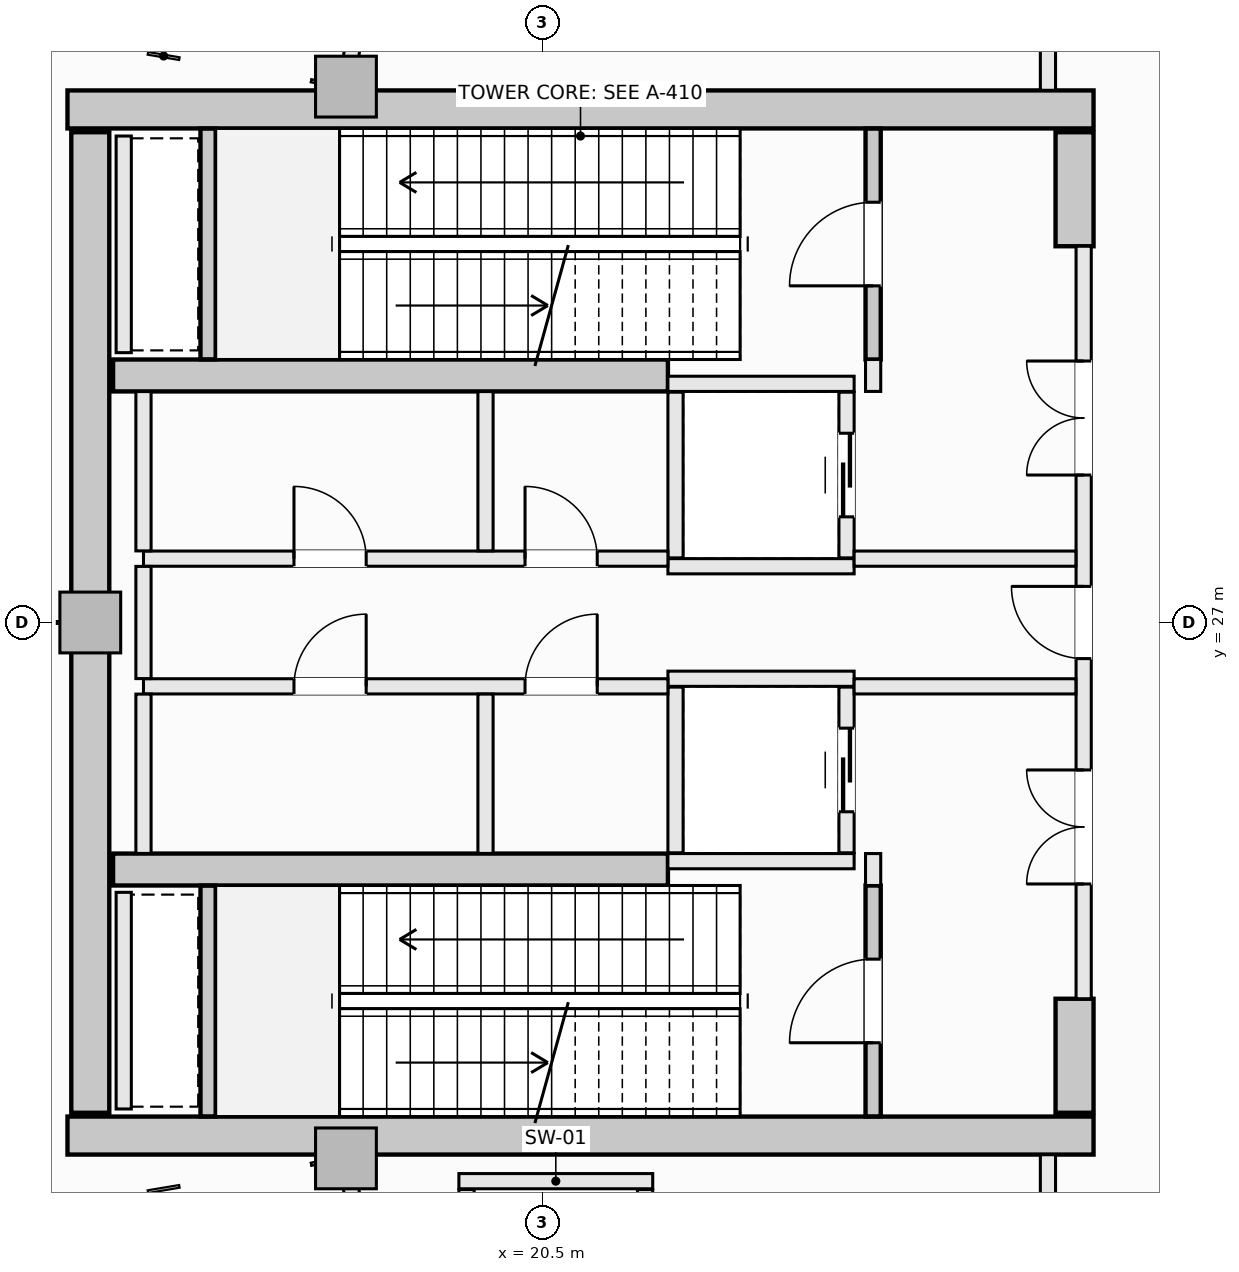
"""IFC4 building model, lengths in metres.
Left out: names, types, materials, properties, quantities, classifications, styles, units other than length and angle.
Written with IfcOpenShell. Run it as: python <this file> out.ifc"""

import sys

from ifc_helpers import new_model, si_unit, direction, frame, frame_2d, origin, origin_2d, place, context, subcontext, project, spatial, rectangle, extrude, element, fill, save


model = new_model("IFC4")
c1 = context("Model", 3, precision=1e-05, world=origin(), true_north=direction((0.0, 1.0)))
c2 = subcontext(c1, "Body", "Model", "MODEL_VIEW")
j1 = project(units=[si_unit("LENGTHUNIT", "METRE"), si_unit("PLANEANGLEUNIT", "RADIAN")], contexts=[c1])
p1 = place(None, origin())
s1 = spatial("IfcSite", under=j1, at=p1, CompositionType="ELEMENT")
p2 = place(p1, origin())
s2 = spatial("IfcBuilding", under=s1, at=p2, CompositionType="ELEMENT")
p3 = place(p2, frame((0.0, 0.0, 275.6)))
s3 = spatial("IfcBuildingStorey", under=s2, at=p3, CompositionType="ELEMENT", Elevation=275.6)
for number, where, z_axis, x_axis in (
    (1, (14.25, 33.75, -0.32), (0.0, 0.0, 1.0), (1.0, 0.0, 0.0)),
    (2, (14.25, 20.25, -0.32), (0.0, 0.0, 1.0), (1.0, 0.0, 0.0)),
):
    element("IfcWall", number, at=place(p3, frame(where, z_axis=z_axis, x_axis=x_axis)), inside=s3, PredefinedType="SHEAR", context=c2, shape_type="SweptSolid", body=[
        extrude(rectangle(XDim=13.5, YDim=0.5, at=frame_2d((6.75, 0.0))), origin(), (0.0, 0.0, 1.0), 6.04),
    ])
p4 = place(p3, frame((14.55, 20.55, -0.32), z_axis=(0.0, 0.0, 1.0), x_axis=(0.0, 1.0, 0.0)))
e3 = element("IfcWall", 3, at=p4, inside=s3, PredefinedType="SHEAR", context=c2, shape_type="SweptSolid", body=[
    extrude(rectangle(XDim=12.9, YDim=0.5, at=frame_2d((6.45, 0.0))), origin(), (0.0, 0.0, 1.0), 6.04),
])
for number, where, z_axis, x_axis in (
    (4, (27.5, 31.95, -0.32), (0.0, 0.0, 1.0), (0.0, 1.0, 0.0)),
    (5, (27.5, 20.55, -0.32), (0.0, 0.0, 1.0), (0.0, 1.0, 0.0)),
):
    element("IfcWall", number, at=place(p3, frame(where, z_axis=z_axis, x_axis=x_axis)), inside=s3, PredefinedType="SHEAR", context=c2, shape_type="SweptSolid", body=[
        extrude(rectangle(XDim=1.5, YDim=0.5, at=frame_2d((0.75, 0.0))), origin(), (0.0, 0.0, 1.0), 6.04),
    ])
for number, where, z_axis, x_axis in (
    (6, (14.85, 30.25, -0.32), (0.0, 0.0, 1.0), (1.0, 0.0, 0.0)),
    (7, (14.85, 23.75, -0.32), (0.0, 0.0, 1.0), (1.0, 0.0, 0.0)),
):
    element("IfcWall", number, at=place(p3, frame(where, z_axis=z_axis, x_axis=x_axis)), inside=s3, PredefinedType="SHEAR", context=c2, shape_type="SweptSolid", body=[
        extrude(rectangle(XDim=7.3, YDim=0.42, at=frame_2d((3.65, 0.0))), origin(), (0.0, 0.0, 1.0), 6.04),
    ])
for number, where, z_axis, x_axis in (
    (8, (17.914, 34.05, -0.32), (0.0, 0.0, 1.0), (1.0, 0.0, 0.0)),
    (9, (14.55, 27.0, -0.32), (0.0, 0.0, 1.0), (1.0, 0.0, 0.0)),
    (10, (17.914, 19.95, -0.32), (0.0, 0.0, 1.0), (1.0, 0.0, 0.0)),
):
    element("IfcColumn", number, at=place(p3, frame(where, z_axis=z_axis, x_axis=x_axis)), inside=s3, PredefinedType="PILASTER", context=c2, shape_type="SweptSolid", body=[
        extrude(rectangle(XDim=0.8, YDim=0.8, at=origin_2d()), origin(), (0.0, 0.0, 1.0), 6.04),
    ])
p5 = place(p3, frame((24.85, 30.46, -0.32), z_axis=(0.0, 0.0, 1.0), x_axis=(0.0, 1.0, 0.0)))
e11 = element("IfcWall", 11, at=p5, inside=s3, PredefinedType="SHEAR", context=c2, shape_type="SweptSolid", body=[
    extrude(rectangle(XDim=3.038, YDim=0.2, at=frame_2d((1.519, 0.0))), origin(), (0.0, 0.0, 1.0), 6.04),
])
p6 = place(p5, frame((0.969, 0.0, 0.32)))
e12 = element("IfcOpeningElement", 12, at=p6, cuts=e11, PredefinedType="OPENING", context=c2, shape_type="SweptSolid", body=[
    extrude(rectangle(XDim=1.1, YDim=2.15, at=frame_2d((0.55, 1.075))), frame((0.0, 0.11, 0.0), z_axis=(0.0, -1.0, 0.0), x_axis=(1.0, 0.0, 0.0)), (0.0, 0.0, 1.0), 0.22),
])
p7 = place(p3, frame((16.1, 30.462, -0.32), z_axis=(0.0, 0.0, 1.0), x_axis=(0.0, 1.0, 0.0)))
e13 = element("IfcWall", 13, at=p7, inside=s3, PredefinedType="SHEAR", context=c2, shape_type="SweptSolid", body=[
    extrude(rectangle(XDim=3.036, YDim=0.2, at=frame_2d((1.518, 0.0))), origin(), (0.0, 0.0, 1.0), 6.04),
])
p8 = place(p3, frame((24.85, 20.502, -0.32), z_axis=(0.0, 0.0, 1.0), x_axis=(0.0, 1.0, 0.0)))
e14 = element("IfcWall", 14, at=p8, inside=s3, PredefinedType="SHEAR", context=c2, shape_type="SweptSolid", body=[
    extrude(rectangle(XDim=3.038, YDim=0.2, at=frame_2d((1.519, 0.0))), origin(), (0.0, 0.0, 1.0), 6.04),
])
p9 = place(p8, frame((0.969, 0.0, 0.32)))
e15 = element("IfcOpeningElement", 15, at=p9, cuts=e14, PredefinedType="OPENING", context=c2, shape_type="SweptSolid", body=[
    extrude(rectangle(XDim=1.1, YDim=2.15, at=frame_2d((0.55, 1.075))), frame((0.0, 0.11, 0.0), z_axis=(0.0, -1.0, 0.0), x_axis=(1.0, 0.0, 0.0)), (0.0, 0.0, 1.0), 0.22),
])
p10 = place(p3, frame((16.1, 20.502, -0.32), z_axis=(0.0, 0.0, 1.0), x_axis=(0.0, 1.0, 0.0)))
e16 = element("IfcWall", 16, at=p10, inside=s3, PredefinedType="SHEAR", context=c2, shape_type="SweptSolid", body=[
    extrude(rectangle(XDim=3.036, YDim=0.2, at=frame_2d((1.518, 0.0))), origin(), (0.0, 0.0, 1.0), 6.04),
])
for number, where, z_axis, x_axis in (
    (17, (22.15, 30.14, 0.0), (0.0, 0.0, 1.0), (1.0, 0.0, 0.0)),
    (18, (22.15, 27.74, 0.0), (0.0, 0.0, 1.0), (1.0, 0.0, 0.0)),
):
    element("IfcWall", number, at=place(p3, frame(where, z_axis=z_axis, x_axis=x_axis)), inside=s3, PredefinedType="SOLIDWALL", context=c2, shape_type="SweptSolid", body=[
        extrude(rectangle(XDim=2.45, YDim=0.2, at=frame_2d((1.225, 0.0))), origin(), (0.0, 0.0, 1.0), 5.72),
    ])
p11 = place(p3, frame((22.25, 27.85, 0.0), z_axis=(0.0, 0.0, 1.0), x_axis=(0.0, 1.0, 0.0)))
e19 = element("IfcWall", 19, at=p11, inside=s3, PredefinedType="SOLIDWALL", context=c2, shape_type="SweptSolid", body=[
    extrude(rectangle(XDim=2.18, YDim=0.2, at=frame_2d((1.09, 0.0))), origin(), (0.0, 0.0, 1.0), 5.72),
])
p12 = place(p3, frame((24.5, 27.85, 0.0), z_axis=(0.0, 0.0, 1.0), x_axis=(0.0, 1.0, 0.0)))
e20 = element("IfcWall", 20, at=p12, inside=s3, PredefinedType="SOLIDWALL", context=c2, shape_type="SweptSolid", body=[
    extrude(rectangle(XDim=2.18, YDim=0.2, at=frame_2d((1.09, 0.0))), origin(), (0.0, 0.0, 1.0), 5.72),
])
p13 = place(p12, frame((0.54, 0.0, 0.0)))
e21 = element("IfcOpeningElement", 21, at=p13, cuts=e20, PredefinedType="OPENING", context=c2, shape_type="SweptSolid", body=[
    extrude(rectangle(XDim=1.1, YDim=2.2, at=frame_2d((0.55, 1.1))), frame((0.0, 0.11, 0.0), z_axis=(0.0, -1.0, 0.0), x_axis=(1.0, 0.0, 0.0)), (0.0, 0.0, 1.0), 0.22),
])
for number, where, z_axis, x_axis in (
    (22, (22.15, 26.26, 0.0), (0.0, 0.0, 1.0), (1.0, 0.0, 0.0)),
    (23, (22.15, 23.86, 0.0), (0.0, 0.0, 1.0), (1.0, 0.0, 0.0)),
):
    element("IfcWall", number, at=place(p3, frame(where, z_axis=z_axis, x_axis=x_axis)), inside=s3, PredefinedType="SOLIDWALL", context=c2, shape_type="SweptSolid", body=[
        extrude(rectangle(XDim=2.45, YDim=0.2, at=frame_2d((1.225, 0.0))), origin(), (0.0, 0.0, 1.0), 5.72),
    ])
p14 = place(p3, frame((22.25, 23.97, 0.0), z_axis=(0.0, 0.0, 1.0), x_axis=(0.0, 1.0, 0.0)))
e24 = element("IfcWall", 24, at=p14, inside=s3, PredefinedType="SOLIDWALL", context=c2, shape_type="SweptSolid", body=[
    extrude(rectangle(XDim=2.18, YDim=0.2, at=frame_2d((1.09, 0.0))), origin(), (0.0, 0.0, 1.0), 5.72),
])
p15 = place(p3, frame((24.5, 23.97, 0.0), z_axis=(0.0, 0.0, 1.0), x_axis=(0.0, 1.0, 0.0)))
e25 = element("IfcWall", 25, at=p15, inside=s3, PredefinedType="SOLIDWALL", context=c2, shape_type="SweptSolid", body=[
    extrude(rectangle(XDim=2.18, YDim=0.2, at=frame_2d((1.09, 0.0))), origin(), (0.0, 0.0, 1.0), 5.72),
])
p16 = place(p15, frame((0.54, 0.0, 0.0)))
e26 = element("IfcOpeningElement", 26, at=p16, cuts=e25, PredefinedType="OPENING", context=c2, shape_type="SweptSolid", body=[
    extrude(rectangle(XDim=1.1, YDim=2.2, at=frame_2d((0.55, 1.1))), frame((0.0, 0.11, 0.0), z_axis=(0.0, -1.0, 0.0), x_axis=(1.0, 0.0, 0.0)), (0.0, 0.0, 1.0), 0.22),
])
p17 = place(p3, frame((19.4, 19.65, 0.0), z_axis=(0.0, 0.0, 1.0), x_axis=(1.0, 0.0, 0.0)))
e27 = element("IfcWall", 27, at=p17, inside=s3, PredefinedType="SOLIDWALL", context=c2, shape_type="SweptSolid", body=[
    extrude(rectangle(XDim=2.55, YDim=0.2, at=frame_2d((1.275, 0.0))), origin(), (0.0, 0.0, 1.0), 5.72),
])
for number, where, z_axis, x_axis in (
    (28, (19.5, 17.01, 0.0), (0.0, 0.0, 1.0), (0.0, 1.0, 0.0)),
    (29, (21.85, 17.01, 0.0), (0.0, 0.0, 1.0), (0.0, 1.0, 0.0)),
):
    element("IfcWall", number, at=place(p3, frame(where, z_axis=z_axis, x_axis=x_axis)), inside=s3, PredefinedType="SOLIDWALL", context=c2, shape_type="SweptSolid", body=[
        extrude(rectangle(XDim=2.53, YDim=0.2, at=frame_2d((1.265, 0.0))), origin(), (0.0, 0.0, 1.0), 5.72),
    ])
for number, where, z_axis, x_axis in (
    (30, (14.99, 30.55, 0.0), (0.0, 0.0, 1.0), (0.0, 1.0, 0.0)),
    (31, (14.99, 20.6, 0.0), (0.0, 0.0, 1.0), (0.0, 1.0, 0.0)),
):
    element("IfcWall", number, at=place(p3, frame(where, z_axis=z_axis, x_axis=x_axis)), inside=s3, PredefinedType="SOLIDWALL", context=c2, shape_type="SweptSolid", body=[
        extrude(rectangle(XDim=2.85, YDim=0.2, at=frame_2d((1.425, 0.0))), origin(), (0.0, 0.0, 1.0), 5.72),
    ])
for number, where, z_axis, x_axis in (
    (32, (24.85, 23.54, 0.0), (0.0, 0.0, 1.0), (0.0, 1.0, 0.0)),
    (33, (24.85, 30.04, 0.0), (0.0, 0.0, 1.0), (0.0, 1.0, 0.0)),
):
    element("IfcWall", number, at=place(p3, frame(where, z_axis=z_axis, x_axis=x_axis)), inside=s3, PredefinedType="SOLIDWALL", context=c2, shape_type="SweptSolid", body=[
        extrude(rectangle(XDim=0.42, YDim=0.2, at=frame_2d((0.21, 0.0))), origin(), (0.0, 0.0, 1.0), 5.72),
    ])
p18 = place(p3, frame((27.62, 22.05, 0.0), z_axis=(0.0, 0.0, 1.0), x_axis=(0.0, 1.0, 0.0)))
e34 = element("IfcWall", 34, at=p18, inside=s3, PredefinedType="SOLIDWALL", context=c2, shape_type="SweptSolid", body=[
    extrude(rectangle(XDim=9.9, YDim=0.2, at=frame_2d((4.95, 0.0))), origin(), (0.0, 0.0, 1.0), 4.812),
])
p19 = place(p18, frame((4.475, 0.0, 0.0)))
e35 = element("IfcOpeningElement", 35, at=p19, cuts=e34, PredefinedType="OPENING", context=c2, shape_type="SweptSolid", body=[
    extrude(rectangle(XDim=0.95, YDim=2.1, at=frame_2d((0.475, 1.05))), frame((0.0, 0.11, 0.0), z_axis=(0.0, -1.0, 0.0), x_axis=(1.0, 0.0, 0.0)), (0.0, 0.0, 1.0), 0.22),
])
p20 = place(p18, frame((6.89, 0.0, 0.0)))
e36 = element("IfcOpeningElement", 36, at=p20, cuts=e34, PredefinedType="OPENING", context=c2, shape_type="SweptSolid", body=[
    extrude(rectangle(XDim=1.5, YDim=2.2, at=frame_2d((0.75, 1.1))), frame((0.0, 0.11, 0.0), z_axis=(0.0, -1.0, 0.0), x_axis=(1.0, 0.0, 0.0)), (0.0, 0.0, 1.0), 0.22),
])
p21 = place(p18, frame((1.51, 0.0, 0.0)))
e37 = element("IfcOpeningElement", 37, at=p21, cuts=e34, PredefinedType="OPENING", context=c2, shape_type="SweptSolid", body=[
    extrude(rectangle(XDim=1.5, YDim=2.2, at=frame_2d((0.75, 1.1))), frame((0.0, 0.11, 0.0), z_axis=(0.0, -1.0, 0.0), x_axis=(1.0, 0.0, 0.0)), (0.0, 0.0, 1.0), 0.22),
])
p22 = place(p3, frame((15.25, 27.84, 0.0), z_axis=(0.0, 0.0, 1.0), x_axis=(1.0, 0.0, 0.0)))
e38 = element("IfcWall", 38, at=p22, inside=s3, PredefinedType="SOLIDWALL", context=c2, shape_type="SweptSolid", body=[
    extrude(rectangle(XDim=6.9, YDim=0.2, at=frame_2d((3.45, 0.0))), origin(), (0.0, 0.0, 1.0), 5.72),
])
p23 = place(p22, frame((5.02, 0.0, 0.0)))
e39 = element("IfcOpeningElement", 39, at=p23, cuts=e38, PredefinedType="OPENING", context=c2, shape_type="SweptSolid", body=[
    extrude(rectangle(XDim=0.95, YDim=2.1, at=frame_2d((0.475, 1.05))), frame((0.0, 0.11, 0.0), z_axis=(0.0, -1.0, 0.0), x_axis=(1.0, 0.0, 0.0)), (0.0, 0.0, 1.0), 0.22),
])
p24 = place(p22, frame((1.98, 0.0, 0.0)))
e40 = element("IfcOpeningElement", 40, at=p24, cuts=e38, PredefinedType="OPENING", context=c2, shape_type="SweptSolid", body=[
    extrude(rectangle(XDim=0.95, YDim=2.1, at=frame_2d((0.475, 1.05))), frame((0.0, 0.11, 0.0), z_axis=(0.0, -1.0, 0.0), x_axis=(1.0, 0.0, 0.0)), (0.0, 0.0, 1.0), 0.22),
])
p25 = place(p3, frame((24.6, 27.84, 0.0), z_axis=(0.0, 0.0, 1.0), x_axis=(1.0, 0.0, 0.0)))
e41 = element("IfcWall", 41, at=p25, inside=s3, PredefinedType="SOLIDWALL", context=c2, shape_type="SweptSolid", body=[
    extrude(rectangle(XDim=2.918, YDim=0.2, at=frame_2d((1.459, 0.0))), origin(), (0.0, 0.0, 1.0), 5.72),
])
p26 = place(p3, frame((15.25, 26.16, 0.0), z_axis=(0.0, 0.0, 1.0), x_axis=(1.0, 0.0, 0.0)))
e42 = element("IfcWall", 42, at=p26, inside=s3, PredefinedType="SOLIDWALL", context=c2, shape_type="SweptSolid", body=[
    extrude(rectangle(XDim=6.9, YDim=0.2, at=frame_2d((3.45, 0.0))), origin(), (0.0, 0.0, 1.0), 5.72),
])
p27 = place(p26, frame((5.02, 0.0, 0.0)))
e43 = element("IfcOpeningElement", 43, at=p27, cuts=e42, PredefinedType="OPENING", context=c2, shape_type="SweptSolid", body=[
    extrude(rectangle(XDim=0.95, YDim=2.1, at=frame_2d((0.475, 1.05))), frame((0.0, 0.11, 0.0), z_axis=(0.0, -1.0, 0.0), x_axis=(1.0, 0.0, 0.0)), (0.0, 0.0, 1.0), 0.22),
])
p28 = place(p26, frame((1.98, 0.0, 0.0)))
e44 = element("IfcOpeningElement", 44, at=p28, cuts=e42, PredefinedType="OPENING", context=c2, shape_type="SweptSolid", body=[
    extrude(rectangle(XDim=0.95, YDim=2.1, at=frame_2d((0.475, 1.05))), frame((0.0, 0.11, 0.0), z_axis=(0.0, -1.0, 0.0), x_axis=(1.0, 0.0, 0.0)), (0.0, 0.0, 1.0), 0.22),
])
p29 = place(p3, frame((24.6, 26.16, 0.0), z_axis=(0.0, 0.0, 1.0), x_axis=(1.0, 0.0, 0.0)))
e45 = element("IfcWall", 45, at=p29, inside=s3, PredefinedType="SOLIDWALL", context=c2, shape_type="SweptSolid", body=[
    extrude(rectangle(XDim=2.918, YDim=0.2, at=frame_2d((1.459, 0.0))), origin(), (0.0, 0.0, 1.0), 5.72),
])
p30 = place(p3, frame((15.25, 23.962, 0.0), z_axis=(0.0, 0.0, 1.0), x_axis=(0.0, 1.0, 0.0)))
e46 = element("IfcWall", 46, at=p30, inside=s3, PredefinedType="SOLIDWALL", context=c2, shape_type="SweptSolid", body=[
    extrude(rectangle(XDim=2.096, YDim=0.2, at=frame_2d((1.048, 0.0))), origin(), (0.0, 0.0, 1.0), 5.72),
])
p31 = place(p3, frame((15.25, 26.262, 0.0), z_axis=(0.0, 0.0, 1.0), x_axis=(0.0, 1.0, 0.0)))
e47 = element("IfcWall", 47, at=p31, inside=s3, PredefinedType="SOLIDWALL", context=c2, shape_type="SweptSolid", body=[
    extrude(rectangle(XDim=1.476, YDim=0.2, at=frame_2d((0.738, 0.0))), origin(), (0.0, 0.0, 1.0), 5.72),
])
for number, where, z_axis, x_axis in (
    (48, (15.25, 27.942, 0.0), (0.0, 0.0, 1.0), (0.0, 1.0, 0.0)),
    (49, (19.75, 23.962, 0.0), (0.0, 0.0, 1.0), (0.0, 1.0, 0.0)),
    (50, (19.75, 27.942, 0.0), (0.0, 0.0, 1.0), (0.0, 1.0, 0.0)),
):
    element("IfcWall", number, at=place(p3, frame(where, z_axis=z_axis, x_axis=x_axis)), inside=s3, PredefinedType="SOLIDWALL", context=c2, shape_type="SweptSolid", body=[
        extrude(rectangle(XDim=2.096, YDim=0.2, at=frame_2d((1.048, 0.0))), origin(), (0.0, 0.0, 1.0), 5.72),
    ])
p32 = place(p3, frame((27.15, 14.95, 0.0), z_axis=(0.0, 0.0, 1.0), x_axis=(0.0, 1.0, 0.0)))
e51 = element("IfcWall", 51, at=p32, inside=s3, PredefinedType="SOLIDWALL", context=c2, shape_type="SweptSolid", body=[
    extrude(rectangle(XDim=5.048, YDim=0.2, at=frame_2d((2.524, 0.0))), origin(), (0.0, 0.0, 1.0), 5.72),
])
p33 = place(p32, frame((2.049, 0.0, 0.0)))
e52 = element("IfcOpeningElement", 52, at=p33, cuts=e51, PredefinedType="OPENING", context=c2, shape_type="SweptSolid", body=[
    extrude(rectangle(XDim=0.95, YDim=2.1, at=frame_2d((0.475, 1.05))), frame((0.0, 0.11, 0.0), z_axis=(0.0, -1.0, 0.0), x_axis=(1.0, 0.0, 0.0)), (0.0, 0.0, 1.0), 0.22),
])
p34 = place(p3, frame((27.15, 34.002, 0.0), z_axis=(0.0, 0.0, 1.0), x_axis=(0.0, 1.0, 0.0)))
e53 = element("IfcWall", 53, at=p34, inside=s3, PredefinedType="SOLIDWALL", context=c2, shape_type="SweptSolid", body=[
    extrude(rectangle(XDim=1.748, YDim=0.2, at=frame_2d((0.874, 0.0))), origin(), (0.0, 0.0, 1.0), 5.72),
])
p35 = place(p3, frame((17.914, 19.95, 0.0), z_axis=(0.0, 0.0, 1.0), x_axis=(0.166098703356, -0.986109132269, 0.0)))
e54 = element("IfcWall", 54, at=p35, inside=s3, PredefinedType="SOLIDWALL", context=c2, shape_type="SweptSolid", body=[
    extrude(rectangle(XDim=1.048, YDim=0.2, at=frame_2d((0.524, 0.0))), origin(), (0.0, 0.0, 1.0), 5.168),
])
p36 = place(p3, frame((17.906, 34.002, 0.0), z_axis=(0.0, 0.0, 1.0), x_axis=(0.166182071534, 0.986095086237, 0.0)))
e55 = element("IfcWall", 55, at=p36, inside=s3, PredefinedType="SOLIDWALL", context=c2, shape_type="SweptSolid", body=[
    extrude(rectangle(XDim=1.199, YDim=0.2, at=frame_2d((0.599, 0.0))), origin(), (0.0, 0.0, 1.0), 5.168),
])
p37 = place(p6, origin())
e56 = element("IfcDoor", 56, at=p37, inside=s3, OperationType="SINGLE_SWING_LEFT", PredefinedType="DOOR", context=c2, shape_type="SweptSolid", body=[
    extrude(rectangle(XDim=1.1, YDim=2.15, at=frame_2d((0.55, 1.075))), frame((0.0, 0.025, 0.0), z_axis=(0.0, -1.0, 0.0), x_axis=(1.0, 0.0, 0.0)), (0.0, 0.0, 1.0), 0.05),
])
fill(e12, e56)
p38 = place(p9, origin())
e57 = element("IfcDoor", 57, at=p38, inside=s3, OperationType="SINGLE_SWING_LEFT", PredefinedType="DOOR", context=c2, shape_type="SweptSolid", body=[
    extrude(rectangle(XDim=1.1, YDim=2.15, at=frame_2d((0.55, 1.075))), frame((0.0, 0.025, 0.0), z_axis=(0.0, -1.0, 0.0), x_axis=(1.0, 0.0, 0.0)), (0.0, 0.0, 1.0), 0.05),
])
fill(e15, e57)
p39 = place(p13, origin())
e58 = element("IfcDoor", 58, at=p39, inside=s3, OperationType="SLIDING_TO_LEFT", PredefinedType="DOOR", context=c2, shape_type="SweptSolid", body=[
    extrude(rectangle(XDim=1.1, YDim=2.2, at=frame_2d((0.55, 1.1))), frame((0.0, 0.025, 0.0), z_axis=(0.0, -1.0, 0.0), x_axis=(1.0, 0.0, 0.0)), (0.0, 0.0, 1.0), 0.05),
])
fill(e21, e58)
p40 = place(p16, origin())
e59 = element("IfcDoor", 59, at=p40, inside=s3, OperationType="SLIDING_TO_LEFT", PredefinedType="DOOR", context=c2, shape_type="SweptSolid", body=[
    extrude(rectangle(XDim=1.1, YDim=2.2, at=frame_2d((0.55, 1.1))), frame((0.0, 0.025, 0.0), z_axis=(0.0, -1.0, 0.0), x_axis=(1.0, 0.0, 0.0)), (0.0, 0.0, 1.0), 0.05),
])
fill(e26, e59)
p41 = place(p19, origin())
e60 = element("IfcDoor", 60, at=p41, inside=s3, OperationType="SINGLE_SWING_RIGHT", PredefinedType="DOOR", context=c2, shape_type="SweptSolid", body=[
    extrude(rectangle(XDim=0.95, YDim=2.1, at=frame_2d((0.475, 1.05))), frame((0.0, 0.025, 0.0), z_axis=(0.0, -1.0, 0.0), x_axis=(1.0, 0.0, 0.0)), (0.0, 0.0, 1.0), 0.05),
])
fill(e35, e60)
p42 = place(p20, origin())
e61 = element("IfcDoor", 61, at=p42, inside=s3, OperationType="DOUBLE_DOOR_SINGLE_SWING", PredefinedType="DOOR", context=c2, shape_type="SweptSolid", body=[
    extrude(rectangle(XDim=1.5, YDim=2.2, at=frame_2d((0.75, 1.1))), frame((0.0, 0.025, 0.0), z_axis=(0.0, -1.0, 0.0), x_axis=(1.0, 0.0, 0.0)), (0.0, 0.0, 1.0), 0.05),
])
fill(e36, e61)
p43 = place(p21, origin())
e62 = element("IfcDoor", 62, at=p43, inside=s3, OperationType="DOUBLE_DOOR_SINGLE_SWING", PredefinedType="DOOR", context=c2, shape_type="SweptSolid", body=[
    extrude(rectangle(XDim=1.5, YDim=2.2, at=frame_2d((0.75, 1.1))), frame((0.0, 0.025, 0.0), z_axis=(0.0, -1.0, 0.0), x_axis=(1.0, 0.0, 0.0)), (0.0, 0.0, 1.0), 0.05),
])
fill(e37, e62)
p44 = place(p23, origin())
e63 = element("IfcDoor", 63, at=p44, inside=s3, OperationType="SINGLE_SWING_LEFT", PredefinedType="DOOR", context=c2, shape_type="SweptSolid", body=[
    extrude(rectangle(XDim=0.95, YDim=2.1, at=frame_2d((0.475, 1.05))), frame((0.0, 0.025, 0.0), z_axis=(0.0, -1.0, 0.0), x_axis=(1.0, 0.0, 0.0)), (0.0, 0.0, 1.0), 0.05),
])
fill(e39, e63)
p45 = place(p27, origin())
e64 = element("IfcDoor", 64, at=p45, inside=s3, OperationType="SINGLE_SWING_RIGHT", PredefinedType="DOOR", context=c2, shape_type="SweptSolid", body=[
    extrude(rectangle(XDim=0.95, YDim=2.1, at=frame_2d((0.475, 1.05))), frame((0.0, 0.025, 0.0), z_axis=(0.0, -1.0, 0.0), x_axis=(1.0, 0.0, 0.0)), (0.0, 0.0, 1.0), 0.05),
])
fill(e43, e64)
p46 = place(p24, origin())
e65 = element("IfcDoor", 65, at=p46, inside=s3, OperationType="SINGLE_SWING_LEFT", PredefinedType="DOOR", context=c2, shape_type="SweptSolid", body=[
    extrude(rectangle(XDim=0.95, YDim=2.1, at=frame_2d((0.475, 1.05))), frame((0.0, 0.025, 0.0), z_axis=(0.0, -1.0, 0.0), x_axis=(1.0, 0.0, 0.0)), (0.0, 0.0, 1.0), 0.05),
])
fill(e40, e65)
p47 = place(p28, origin())
e66 = element("IfcDoor", 66, at=p47, inside=s3, OperationType="SINGLE_SWING_RIGHT", PredefinedType="DOOR", context=c2, shape_type="SweptSolid", body=[
    extrude(rectangle(XDim=0.95, YDim=2.1, at=frame_2d((0.475, 1.05))), frame((0.0, 0.025, 0.0), z_axis=(0.0, -1.0, 0.0), x_axis=(1.0, 0.0, 0.0)), (0.0, 0.0, 1.0), 0.05),
])
fill(e44, e66)
save(model, sys.argv[1])
